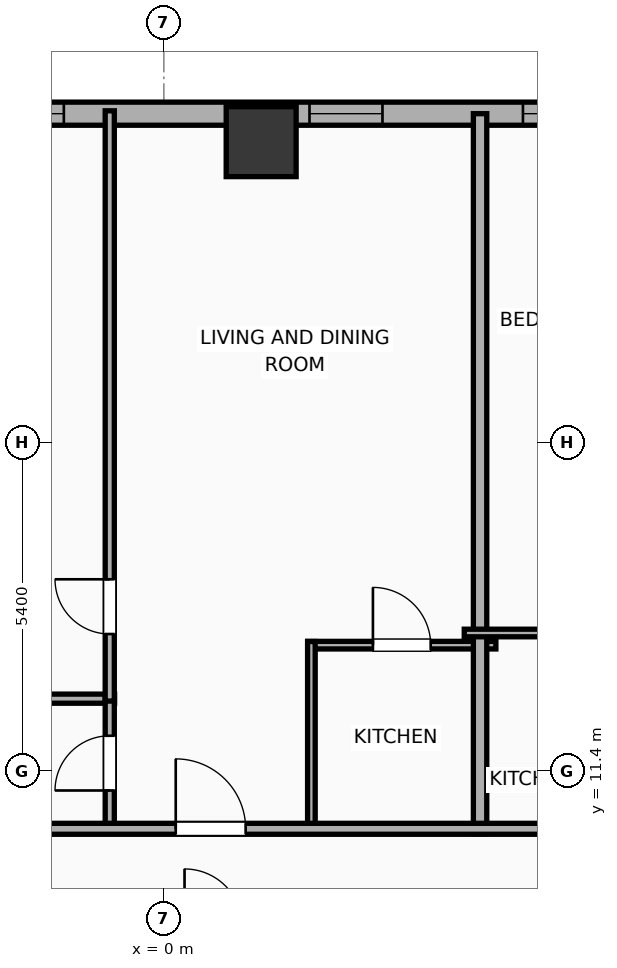
"""IFC4 building model, lengths in metres.
Left out: names, types, materials, properties, quantities, classifications, styles, units other than length and angle.
Written with IfcOpenShell. Run it as: python <this file> out.ifc"""

import sys

from ifc_helpers import new_model, si_unit, direction, frame, frame_2d, origin, origin_2d, place, context, subcontext, project, spatial, rectangle, hollow_rectangle, extrude, element, fill, save


model = new_model("IFC4")
c1 = context("Model", 3, precision=1e-05, world=origin(), true_north=direction((0.0, 1.0)))
c2 = subcontext(c1, "Body", "Model", "MODEL_VIEW")
j1 = project(units=[si_unit("LENGTHUNIT", "METRE"), si_unit("PLANEANGLEUNIT", "RADIAN")], contexts=[c1])
p1 = place(None, origin())
s1 = spatial("IfcSite", under=j1, at=p1, CompositionType="ELEMENT")
p2 = place(p1, origin())
s2 = spatial("IfcBuilding", under=s1, at=p2, CompositionType="ELEMENT")
p3 = place(p2, frame((0.0, 0.0, 72.8)))
s3 = spatial("IfcBuildingStorey", under=s2, at=p3, CompositionType="ELEMENT", Elevation=72.8)
p4 = place(p3, frame((1.6, 21.75, 0.0), z_axis=(0.0, 0.0, 1.0), x_axis=(1.0, 0.0, 0.0)))
e1 = element("IfcColumn", 1, at=p4, inside=s3, PredefinedType="COLUMN", context=c2, shape_type="SweptSolid", body=[
    extrude(hollow_rectangle(XDim=1.15, YDim=1.15, WallThickness=0.04, at=origin_2d()), origin(), (0.0, 0.0, 1.0), 3.9),
])
p5 = place(p3, frame((-29.581, 22.21, 0.0), z_axis=(0.0, 0.0, 1.0), x_axis=(1.0, 0.0, 0.0)))
e2 = element("IfcWall", 2, at=p5, inside=s3, PredefinedType="ELEMENTEDWALL", context=c2, shape_type="SweptSolid", body=[
    extrude(rectangle(XDim=51.963, YDim=0.38, at=frame_2d((25.981, 0.0))), origin(), (0.0, 0.0, 1.0), 3.65),
])
p6 = place(p5, frame((5.81, 0.0, 0.75)))
e3 = element("IfcOpeningElement", 3, at=p6, cuts=e2, PredefinedType="OPENING", context=c2, shape_type="SweptSolid", body=[
    extrude(rectangle(XDim=2.4, YDim=2.1, at=frame_2d((1.2, 1.05))), frame((0.0, 0.2, 0.0), z_axis=(0.0, -1.0, 0.0), x_axis=(1.0, 0.0, 0.0)), (0.0, 0.0, 1.0), 0.4),
])
p7 = place(p5, frame((23.131, 0.0, 0.75)))
e4 = element("IfcOpeningElement", 4, at=p7, cuts=e2, PredefinedType="OPENING", context=c2, shape_type="SweptSolid", body=[
    extrude(rectangle(XDim=2.4, YDim=2.1, at=frame_2d((1.2, 1.05))), frame((0.0, 0.2, 0.0), z_axis=(0.0, -1.0, 0.0), x_axis=(1.0, 0.0, 0.0)), (0.0, 0.0, 1.0), 0.4),
])
p8 = place(p5, frame((43.752, 0.0, 0.75)))
e5 = element("IfcOpeningElement", 5, at=p8, cuts=e2, PredefinedType="OPENING", context=c2, shape_type="SweptSolid", body=[
    extrude(rectangle(XDim=2.4, YDim=2.1, at=frame_2d((1.2, 1.05))), frame((0.0, 0.2, 0.0), z_axis=(0.0, -1.0, 0.0), x_axis=(1.0, 0.0, 0.0)), (0.0, 0.0, 1.0), 0.4),
])
p9 = place(p5, frame((2.819, 0.0, 0.75)))
e6 = element("IfcOpeningElement", 6, at=p9, cuts=e2, PredefinedType="OPENING", context=c2, shape_type="SweptSolid", body=[
    extrude(rectangle(XDim=1.2, YDim=2.05, at=frame_2d((0.6, 1.025))), frame((0.0, 0.2, 0.0), z_axis=(0.0, -1.0, 0.0), x_axis=(1.0, 0.0, 0.0)), (0.0, 0.0, 1.0), 0.4),
])
p10 = place(p5, frame((11.781, 0.0, 0.75)))
e7 = element("IfcOpeningElement", 7, at=p10, cuts=e2, PredefinedType="OPENING", context=c2, shape_type="SweptSolid", body=[
    extrude(rectangle(XDim=1.2, YDim=2.05, at=frame_2d((0.6, 1.025))), frame((0.0, 0.2, 0.0), z_axis=(0.0, -1.0, 0.0), x_axis=(1.0, 0.0, 0.0)), (0.0, 0.0, 1.0), 0.4),
])
p11 = place(p5, frame((8.781, 0.0, 0.75)))
e8 = element("IfcOpeningElement", 8, at=p11, cuts=e2, PredefinedType="OPENING", context=c2, shape_type="SweptSolid", body=[
    extrude(rectangle(XDim=0.85, YDim=2.05, at=frame_2d((0.425, 1.025))), frame((0.0, 0.2, 0.0), z_axis=(0.0, -1.0, 0.0), x_axis=(1.0, 0.0, 0.0)), (0.0, 0.0, 1.0), 0.4),
])
p12 = place(p5, frame((14.876, 0.0, 0.75)))
e9 = element("IfcOpeningElement", 9, at=p12, cuts=e2, PredefinedType="OPENING", context=c2, shape_type="SweptSolid", body=[
    extrude(rectangle(XDim=1.2, YDim=2.05, at=frame_2d((0.6, 1.025))), frame((0.0, 0.2, 0.0), z_axis=(0.0, -1.0, 0.0), x_axis=(1.0, 0.0, 0.0)), (0.0, 0.0, 1.0), 0.4),
])
p13 = place(p5, frame((21.521, 0.0, 0.75)))
e10 = element("IfcOpeningElement", 10, at=p13, cuts=e2, PredefinedType="OPENING", context=c2, shape_type="SweptSolid", body=[
    extrude(rectangle(XDim=0.52, YDim=2.05, at=frame_2d((0.26, 1.025))), frame((0.0, 0.2, 0.0), z_axis=(0.0, -1.0, 0.0), x_axis=(1.0, 0.0, 0.0)), (0.0, 0.0, 1.0), 0.4),
])
p14 = place(p5, frame((17.886, 0.0, 0.75)))
e11 = element("IfcOpeningElement", 11, at=p14, cuts=e2, PredefinedType="OPENING", context=c2, shape_type="SweptSolid", body=[
    extrude(rectangle(XDim=1.2, YDim=2.05, at=frame_2d((0.6, 1.025))), frame((0.0, 0.2, 0.0), z_axis=(0.0, -1.0, 0.0), x_axis=(1.0, 0.0, 0.0)), (0.0, 0.0, 1.0), 0.4),
])
p15 = place(p5, frame((26.736, 0.0, 0.75)))
e12 = element("IfcOpeningElement", 12, at=p15, cuts=e2, PredefinedType="OPENING", context=c2, shape_type="SweptSolid", body=[
    extrude(rectangle(XDim=1.2, YDim=2.05, at=frame_2d((0.6, 1.025))), frame((0.0, 0.2, 0.0), z_axis=(0.0, -1.0, 0.0), x_axis=(1.0, 0.0, 0.0)), (0.0, 0.0, 1.0), 0.4),
])
p16 = place(p5, frame((31.976, 0.0, 0.75)))
e13 = element("IfcOpeningElement", 13, at=p16, cuts=e2, PredefinedType="OPENING", context=c2, shape_type="SweptSolid", body=[
    extrude(rectangle(XDim=1.2, YDim=2.05, at=frame_2d((0.6, 1.025))), frame((0.0, 0.2, 0.0), z_axis=(0.0, -1.0, 0.0), x_axis=(1.0, 0.0, 0.0)), (0.0, 0.0, 1.0), 0.4),
])
p17 = place(p5, frame((38.181, 0.0, 0.75)))
e14 = element("IfcOpeningElement", 14, at=p17, cuts=e2, PredefinedType="OPENING", context=c2, shape_type="SweptSolid", body=[
    extrude(rectangle(XDim=1.2, YDim=2.05, at=frame_2d((0.6, 1.025))), frame((0.0, 0.2, 0.0), z_axis=(0.0, -1.0, 0.0), x_axis=(1.0, 0.0, 0.0)), (0.0, 0.0, 1.0), 0.4),
])
p18 = place(p5, frame((35.486, 0.0, 0.75)))
e15 = element("IfcOpeningElement", 15, at=p18, cuts=e2, PredefinedType="OPENING", context=c2, shape_type="SweptSolid", body=[
    extrude(rectangle(XDim=1.2, YDim=2.05, at=frame_2d((0.6, 1.025))), frame((0.0, 0.2, 0.0), z_axis=(0.0, -1.0, 0.0), x_axis=(1.0, 0.0, 0.0)), (0.0, 0.0, 1.0), 0.4),
])
p19 = place(p5, frame((42.411, 0.0, 0.75)))
e16 = element("IfcOpeningElement", 16, at=p19, cuts=e2, PredefinedType="OPENING", context=c2, shape_type="SweptSolid", body=[
    extrude(rectangle(XDim=0.85, YDim=2.05, at=frame_2d((0.425, 1.025))), frame((0.0, 0.2, 0.0), z_axis=(0.0, -1.0, 0.0), x_axis=(1.0, 0.0, 0.0)), (0.0, 0.0, 1.0), 0.4),
])
p20 = place(p5, frame((47.943, 0.0, 0.75)))
e17 = element("IfcOpeningElement", 17, at=p20, cuts=e2, PredefinedType="OPENING", context=c2, shape_type="SweptSolid", body=[
    extrude(rectangle(XDim=1.2, YDim=2.05, at=frame_2d((0.6, 1.025))), frame((0.0, 0.2, 0.0), z_axis=(0.0, -1.0, 0.0), x_axis=(1.0, 0.0, 0.0)), (0.0, 0.0, 1.0), 0.4),
])
p21 = place(p5, frame((49.901, 0.0, 0.75)))
e18 = element("IfcOpeningElement", 18, at=p21, cuts=e2, PredefinedType="OPENING", context=c2, shape_type="SweptSolid", body=[
    extrude(rectangle(XDim=1.2, YDim=2.05, at=frame_2d((0.6, 1.025))), frame((0.0, 0.2, 0.0), z_axis=(0.0, -1.0, 0.0), x_axis=(1.0, 0.0, 0.0)), (0.0, 0.0, 1.0), 0.4),
])
p22 = place(p3, frame((-3.86, 12.59, 0.0), z_axis=(0.0, 0.0, 1.0), x_axis=(1.0, 0.0, 0.0)))
e19 = element("IfcWall", 19, at=p22, inside=s3, PredefinedType="PLUMBINGWALL", context=c2, shape_type="SweptSolid", body=[
    extrude(rectangle(XDim=3.05, YDim=0.15, at=frame_2d((1.525, 0.0))), origin(), (0.0, 0.0, 1.0), 3.65),
])
p23 = place(p3, frame((-0.89, 10.43, 0.0), z_axis=(0.0, 0.0, 1.0), x_axis=(0.0, 1.0, 0.0)))
e20 = element("IfcWall", 20, at=p23, inside=s3, PredefinedType="PLUMBINGWALL", context=c2, shape_type="SweptSolid", body=[
    extrude(rectangle(XDim=2.2, YDim=0.15, at=frame_2d((1.1, 0.0))), origin(), (0.0, 0.0, 1.0), 3.65),
])
p24 = place(p23, frame((0.65, 0.0, 0.0)))
e21 = element("IfcOpeningElement", 21, at=p24, cuts=e20, PredefinedType="OPENING", context=c2, shape_type="SweptSolid", body=[
    extrude(rectangle(XDim=0.9, YDim=2.05, at=frame_2d((0.45, 1.025))), frame((0.0, 0.085, 0.0), z_axis=(0.0, -1.0, 0.0), x_axis=(1.0, 0.0, 0.0)), (0.0, 0.0, 1.0), 0.17),
])
p25 = place(p3, frame((-0.89, 12.55, 0.0), z_axis=(0.0, 0.0, 1.0), x_axis=(0.0, 1.0, 0.0)))
e22 = element("IfcWall", 22, at=p25, inside=s3, PredefinedType="PLUMBINGWALL", context=c2, shape_type="SweptSolid", body=[
    extrude(rectangle(XDim=9.708, YDim=0.15, at=frame_2d((4.854, 0.0))), origin(), (0.0, 0.0, 1.0), 3.65),
])
p26 = place(p25, frame((1.103, 0.0, 0.0)))
e23 = element("IfcOpeningElement", 23, at=p26, cuts=e22, PredefinedType="OPENING", context=c2, shape_type="SweptSolid", body=[
    extrude(rectangle(XDim=0.9, YDim=2.05, at=frame_2d((0.45, 1.025))), frame((0.0, 0.085, 0.0), z_axis=(0.0, -1.0, 0.0), x_axis=(1.0, 0.0, 0.0)), (0.0, 0.0, 1.0), 0.17),
])
p27 = place(p3, frame((2.366, 13.47, 0.0), z_axis=(0.0, 0.0, 1.0), x_axis=(1.0, 0.0, 0.0)))
e24 = element("IfcWall", 24, at=p27, inside=s3, PredefinedType="PARTITIONING", context=c2, shape_type="SweptSolid", body=[
    extrude(rectangle(XDim=3.094, YDim=0.125, at=frame_2d((1.547, 0.0))), origin(), (0.0, 0.0, 1.0), 3.65),
])
p28 = place(p27, frame((1.072, 0.0, 0.0)))
e25 = element("IfcOpeningElement", 25, at=p28, cuts=e24, PredefinedType="OPENING", context=c2, shape_type="SweptSolid", body=[
    extrude(rectangle(XDim=0.95, YDim=2.05, at=frame_2d((0.475, 1.025))), frame((0.0, 0.073, 0.0), z_axis=(0.0, -1.0, 0.0), x_axis=(1.0, 0.0, 0.0)), (0.0, 0.0, 1.0), 0.145),
])
p29 = place(p3, frame((2.426, 10.43, 0.0), z_axis=(0.0, 0.0, 1.0), x_axis=(0.0, 1.0, 0.0)))
e26 = element("IfcWall", 26, at=p29, inside=s3, PredefinedType="PARTITIONING", context=c2, shape_type="SweptSolid", body=[
    extrude(rectangle(XDim=3.1, YDim=0.125, at=frame_2d((1.55, 0.0))), origin(), (0.0, 0.0, 1.0), 3.65),
])
p30 = place(p3, frame((5.2, 10.37, 0.0), z_axis=(0.0, 0.0, 1.0), x_axis=(0.0, 1.0, 0.0)))
e27 = element("IfcWall", 27, at=p30, inside=s3, PredefinedType="PARTITIONING", context=c2, shape_type="SweptSolid", body=[
    extrude(rectangle(XDim=11.84, YDim=0.22, at=frame_2d((5.92, 0.0))), origin(), (0.0, 0.0, 1.0), 3.65),
])
p31 = place(p3, frame((4.94, 13.67, 0.0), z_axis=(0.0, 0.0, 1.0), x_axis=(1.0, 0.0, 0.0)))
e28 = element("IfcWall", 28, at=p31, inside=s3, PredefinedType="PARTITIONING", context=c2, shape_type="SweptSolid", body=[
    extrude(rectangle(XDim=2.99, YDim=0.125, at=frame_2d((1.495, 0.0))), origin(), (0.0, 0.0, 1.0), 3.65),
])
p32 = place(p3, frame((-33.41, 10.45, 0.0), z_axis=(0.0, 0.0, 1.0), x_axis=(1.0, 0.0, 0.0)))
e29 = element("IfcWall", 29, at=p32, inside=s3, PredefinedType="PARTITIONING", context=c2, shape_type="SweptSolid", body=[
    extrude(rectangle(XDim=59.62, YDim=0.18, at=frame_2d((29.81, 0.0))), origin(), (0.0, 0.0, 1.0), 3.65),
])
p33 = place(p32, frame((2.686, 0.0, 0.0)))
e30 = element("IfcOpeningElement", 30, at=p33, cuts=e29, PredefinedType="OPENING", context=c2, shape_type="SweptSolid", body=[
    extrude(rectangle(XDim=0.9, YDim=2.05, at=frame_2d((0.45, 1.025))), frame((0.0, 0.1, 0.0), z_axis=(0.0, -1.0, 0.0), x_axis=(1.0, 0.0, 0.0)), (0.0, 0.0, 1.0), 0.2),
])
p34 = place(p32, frame((9.698, 0.0, 0.0)))
e31 = element("IfcOpeningElement", 31, at=p34, cuts=e29, PredefinedType="OPENING", context=c2, shape_type="SweptSolid", body=[
    extrude(rectangle(XDim=1.15, YDim=2.05, at=frame_2d((0.575, 1.025))), frame((0.0, 0.1, 0.0), z_axis=(0.0, -1.0, 0.0), x_axis=(1.0, 0.0, 0.0)), (0.0, 0.0, 1.0), 0.2),
])
p35 = place(p32, frame((16.22, 0.0, 0.0)))
e32 = element("IfcOpeningElement", 32, at=p35, cuts=e29, PredefinedType="OPENING", context=c2, shape_type="SweptSolid", body=[
    extrude(rectangle(XDim=1.15, YDim=2.05, at=frame_2d((0.575, 1.025))), frame((0.0, 0.1, 0.0), z_axis=(0.0, -1.0, 0.0), x_axis=(1.0, 0.0, 0.0)), (0.0, 0.0, 1.0), 0.2),
])
p36 = place(p32, frame((25.073, 0.0, 0.0)))
e33 = element("IfcOpeningElement", 33, at=p36, cuts=e29, PredefinedType="OPENING", context=c2, shape_type="SweptSolid", body=[
    extrude(rectangle(XDim=1.15, YDim=2.05, at=frame_2d((0.575, 1.025))), frame((0.0, 0.1, 0.0), z_axis=(0.0, -1.0, 0.0), x_axis=(1.0, 0.0, 0.0)), (0.0, 0.0, 1.0), 0.2),
])
p37 = place(p32, frame((33.605, 0.0, 0.0)))
e34 = element("IfcOpeningElement", 34, at=p37, cuts=e29, PredefinedType="OPENING", context=c2, shape_type="SweptSolid", body=[
    extrude(rectangle(XDim=1.15, YDim=2.05, at=frame_2d((0.575, 1.025))), frame((0.0, 0.1, 0.0), z_axis=(0.0, -1.0, 0.0), x_axis=(1.0, 0.0, 0.0)), (0.0, 0.0, 1.0), 0.2),
])
p38 = place(p32, frame((42.649, 0.0, 0.0)))
e35 = element("IfcOpeningElement", 35, at=p38, cuts=e29, PredefinedType="OPENING", context=c2, shape_type="SweptSolid", body=[
    extrude(rectangle(XDim=1.15, YDim=2.05, at=frame_2d((0.575, 1.025))), frame((0.0, 0.1, 0.0), z_axis=(0.0, -1.0, 0.0), x_axis=(1.0, 0.0, 0.0)), (0.0, 0.0, 1.0), 0.2),
])
p39 = place(p32, frame((48.772, 0.0, 0.0)))
e36 = element("IfcOpeningElement", 36, at=p39, cuts=e29, PredefinedType="OPENING", context=c2, shape_type="SweptSolid", body=[
    extrude(rectangle(XDim=1.15, YDim=2.05, at=frame_2d((0.575, 1.025))), frame((0.0, 0.1, 0.0), z_axis=(0.0, -1.0, 0.0), x_axis=(1.0, 0.0, 0.0)), (0.0, 0.0, 1.0), 0.2),
])
p40 = place(p32, frame((56.272, 0.0, 0.0)))
e37 = element("IfcOpeningElement", 37, at=p40, cuts=e29, PredefinedType="OPENING", context=c2, shape_type="SweptSolid", body=[
    extrude(rectangle(XDim=0.9, YDim=2.05, at=frame_2d((0.45, 1.025))), frame((0.0, 0.1, 0.0), z_axis=(0.0, -1.0, 0.0), x_axis=(1.0, 0.0, 0.0)), (0.0, 0.0, 1.0), 0.2),
])
p41 = place(p15, origin())
e38 = element("IfcWindow", 38, at=p41, inside=s3, PartitioningType="SINGLE_PANEL", PredefinedType="WINDOW", context=c2, shape_type="SweptSolid", body=[
    extrude(rectangle(XDim=1.2, YDim=2.05, at=frame_2d((0.6, 1.025))), frame((0.0, 0.03, 0.0), z_axis=(0.0, -1.0, 0.0), x_axis=(1.0, 0.0, 0.0)), (0.0, 0.0, 1.0), 0.06),
])
fill(e12, e38)
p42 = place(p16, origin())
e39 = element("IfcWindow", 39, at=p42, inside=s3, PartitioningType="SINGLE_PANEL", PredefinedType="WINDOW", context=c2, shape_type="SweptSolid", body=[
    extrude(rectangle(XDim=1.2, YDim=2.05, at=frame_2d((0.6, 1.025))), frame((0.0, 0.03, 0.0), z_axis=(0.0, -1.0, 0.0), x_axis=(1.0, 0.0, 0.0)), (0.0, 0.0, 1.0), 0.06),
])
fill(e13, e39)
p43 = place(p18, origin())
e40 = element("IfcWindow", 40, at=p43, inside=s3, PartitioningType="SINGLE_PANEL", PredefinedType="WINDOW", context=c2, shape_type="SweptSolid", body=[
    extrude(rectangle(XDim=1.2, YDim=2.05, at=frame_2d((0.6, 1.025))), frame((0.0, 0.03, 0.0), z_axis=(0.0, -1.0, 0.0), x_axis=(1.0, 0.0, 0.0)), (0.0, 0.0, 1.0), 0.06),
])
fill(e15, e40)
p44 = place(p24, origin())
e41 = element("IfcDoor", 41, at=p44, inside=s3, OperationType="SINGLE_SWING_LEFT", PredefinedType="DOOR", context=c2, shape_type="SweptSolid", body=[
    extrude(rectangle(XDim=0.9, YDim=2.05, at=frame_2d((0.45, 1.025))), frame((0.0, 0.025, 0.0), z_axis=(0.0, -1.0, 0.0), x_axis=(1.0, 0.0, 0.0)), (0.0, 0.0, 1.0), 0.05),
])
fill(e21, e41)
p45 = place(p26, origin())
e42 = element("IfcDoor", 42, at=p45, inside=s3, OperationType="SINGLE_SWING_RIGHT", PredefinedType="DOOR", context=c2, shape_type="SweptSolid", body=[
    extrude(rectangle(XDim=0.9, YDim=2.05, at=frame_2d((0.45, 1.025))), frame((0.0, 0.025, 0.0), z_axis=(0.0, -1.0, 0.0), x_axis=(1.0, 0.0, 0.0)), (0.0, 0.0, 1.0), 0.05),
])
fill(e23, e42)
p46 = place(p28, origin())
e43 = element("IfcDoor", 43, at=p46, inside=s3, OperationType="SINGLE_SWING_LEFT", PredefinedType="DOOR", context=c2, shape_type="SweptSolid", body=[
    extrude(rectangle(XDim=0.95, YDim=2.05, at=frame_2d((0.475, 1.025))), frame((0.0, 0.025, 0.0), z_axis=(0.0, -1.0, 0.0), x_axis=(1.0, 0.0, 0.0)), (0.0, 0.0, 1.0), 0.05),
])
fill(e25, e43)
p47 = place(p37, origin())
e44 = element("IfcDoor", 44, at=p47, inside=s3, OperationType="SINGLE_SWING_LEFT", PredefinedType="DOOR", context=c2, shape_type="SweptSolid", body=[
    extrude(rectangle(XDim=1.15, YDim=2.05, at=frame_2d((0.575, 1.025))), frame((0.0, 0.025, 0.0), z_axis=(0.0, -1.0, 0.0), x_axis=(1.0, 0.0, 0.0)), (0.0, 0.0, 1.0), 0.05),
])
fill(e34, e44)
save(model, sys.argv[1])
